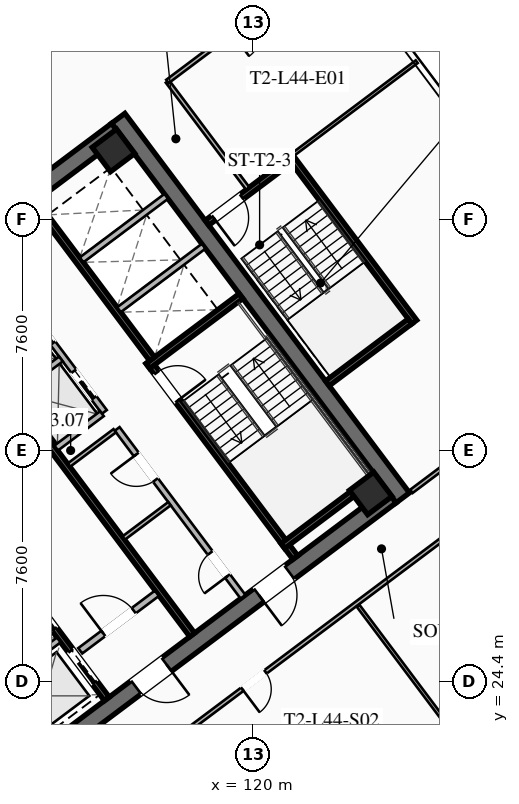
"""IFC4 building model, lengths in metres.
Left out: names, types, materials, properties, quantities, classifications, styles, units other than length and angle.
Written with IfcOpenShell. Run it as: python <this file> out.ifc"""

import sys

from ifc_helpers import new_model, si_unit, direction, frame, frame_2d, origin, origin_2d, place, context, subcontext, project, spatial, rectangle, hollow_rectangle, extrude, element, fill, save


model = new_model("IFC4")
c1 = context("Model", 3, precision=1e-05, world=origin(), true_north=direction((0.0, 1.0)))
c2 = subcontext(c1, "Body", "Model", "MODEL_VIEW")
j1 = project(units=[si_unit("LENGTHUNIT", "METRE"), si_unit("PLANEANGLEUNIT", "RADIAN")], contexts=[c1])
p1 = place(None, origin())
s1 = spatial("IfcSite", under=j1, at=p1, CompositionType="ELEMENT")
p2 = place(p1, origin())
s2 = spatial("IfcBuilding", under=s1, at=p2, CompositionType="ELEMENT")
p3 = place(p2, frame((0.0, 0.0, 164.1)))
s3 = spatial("IfcBuildingStorey", under=s2, at=p3, CompositionType="ELEMENT", Elevation=164.1)
p4 = place(p3, frame((115.564, 42.923, 0.0), z_axis=(0.0, 0.0, 1.0), x_axis=(0.600005007985, -0.799996243986, 0.0)))
e1 = element("IfcWall", 1, at=p4, inside=s3, PredefinedType="SHEAR", context=c2, shape_type="SweptSolid", body=[
    extrude(rectangle(XDim=15.6, YDim=0.55, at=frame_2d((7.8, 0.0))), origin(), (0.0, 0.0, 1.0), 3.55),
])
p5 = place(p3, frame((124.539, 30.498, 0.0), z_axis=(0.0, 0.0, 1.0), x_axis=(-0.799998054672, -0.600002593761, 0.0)))
e2 = element("IfcWall", 2, at=p5, inside=s3, PredefinedType="SHEAR", context=c2, shape_type="SweptSolid", body=[
    extrude(rectangle(XDim=15.06, YDim=0.55, at=frame_2d((7.53, 0.0))), origin(), (0.0, 0.0, 1.0), 3.55),
])
p6 = place(p5, frame((9.23, 0.0, 0.0)))
e3 = element("IfcOpeningElement", 3, at=p6, cuts=e2, PredefinedType="OPENING", context=c2, shape_type="SweptSolid", body=[
    extrude(rectangle(XDim=1.25, YDim=2.25, at=frame_2d((0.625, 1.125))), frame((0.0, 0.285, 0.0), z_axis=(0.0, -1.0, 0.0), x_axis=(1.0, 0.0, 0.0)), (0.0, 0.0, 1.0), 0.57),
])
p7 = place(p5, frame((4.18, 0.0, 0.0)))
e4 = element("IfcOpeningElement", 4, at=p7, cuts=e2, PredefinedType="OPENING", context=c2, shape_type="SweptSolid", body=[
    extrude(rectangle(XDim=1.25, YDim=2.25, at=frame_2d((0.625, 1.125))), frame((0.0, 0.285, 0.0), z_axis=(0.0, -1.0, 0.0), x_axis=(1.0, 0.0, 0.0)), (0.0, 0.0, 1.0), 0.57),
])
p8 = place(p3, frame((103.461, 33.502, 0.0), z_axis=(0.0, 0.0, 1.0), x_axis=(0.799998054672, 0.600002593761, 0.0)))
e5 = element("IfcWall", 5, at=p8, inside=s3, PredefinedType="SHEAR", context=c2, shape_type="SweptSolid", body=[
    extrude(rectangle(XDim=15.06, YDim=0.55, at=frame_2d((7.53, 0.0))), origin(), (0.0, 0.0, 1.0), 3.55),
])
p9 = place(p8, frame((4.58, 0.0, 0.0)))
e6 = element("IfcOpeningElement", 6, at=p9, cuts=e5, PredefinedType="OPENING", context=c2, shape_type="SweptSolid", body=[
    extrude(rectangle(XDim=1.25, YDim=2.25, at=frame_2d((0.625, 1.125))), frame((0.0, 0.285, 0.0), z_axis=(0.0, -1.0, 0.0), x_axis=(1.0, 0.0, 0.0)), (0.0, 0.0, 1.0), 0.57),
])
p10 = place(p8, frame((9.63, 0.0, 0.0)))
e7 = element("IfcOpeningElement", 7, at=p10, cuts=e5, PredefinedType="OPENING", context=c2, shape_type="SweptSolid", body=[
    extrude(rectangle(XDim=1.25, YDim=2.25, at=frame_2d((0.625, 1.125))), frame((0.0, 0.285, 0.0), z_axis=(0.0, -1.0, 0.0), x_axis=(1.0, 0.0, 0.0)), (0.0, 0.0, 1.0), 0.57),
])
for number, where, z_axis, x_axis in (
    (8, (123.87, 30.59, 0.0), (0.0, 0.0, 1.0), (0.8, 0.6, 0.0)),
    (9, (115.41, 41.87, 0.0), (0.0, 0.0, 1.0), (0.8, 0.6, 0.0)),
):
    element("IfcColumn", number, at=place(p3, frame(where, z_axis=z_axis, x_axis=x_axis)), inside=s3, PredefinedType="COLUMN", context=c2, shape_type="SweptSolid", body=[
        extrude(hollow_rectangle(XDim=1.0, YDim=1.0, WallThickness=0.04, at=origin_2d()), origin(), (0.0, 0.0, 1.0), 3.37),
    ])
p11 = place(p3, frame((116.56, 34.92, 0.0), z_axis=(0.0, 0.0, 1.0), x_axis=(0.59999029481, -0.8000072788, 0.0)))
e10 = element("IfcWall", 10, at=p11, inside=s3, PredefinedType="SHEAR", context=c2, shape_type="SweptSolid", body=[
    extrude(rectangle(XDim=8.05, YDim=0.2, at=frame_2d((4.025, 0.0))), origin(), (0.0, 0.0, 1.0), 3.37),
])
p12 = place(p11, frame((0.45, 0.0, 0.0)))
e11 = element("IfcOpeningElement", 11, at=p12, cuts=e10, PredefinedType="OPENING", context=c2, shape_type="SweptSolid", body=[
    extrude(rectangle(XDim=1.15, YDim=2.2, at=frame_2d((0.575, 1.1))), frame((0.0, 0.11, 0.0), z_axis=(0.0, -1.0, 0.0), x_axis=(1.0, 0.0, 0.0)), (0.0, 0.0, 1.0), 0.22),
])
for number, where, z_axis, x_axis in (
    (12, (116.54, 34.78, 0.0), (0.0, 0.0, 1.0), (0.8, 0.6, 0.0)),
    (13, (120.98, 28.86, 0.0), (0.0, 0.0, 1.0), (0.8, 0.6, 0.0)),
):
    element("IfcWall", number, at=place(p3, frame(where, z_axis=z_axis, x_axis=x_axis)), inside=s3, PredefinedType="SHEAR", context=c2, shape_type="SweptSolid", body=[
        extrude(rectangle(XDim=3.83, YDim=0.2, at=frame_2d((1.915, 0.0))), origin(), (0.0, 0.0, 1.0), 3.37),
    ])
p13 = place(p3, frame((117.998, 25.936, 0.0), z_axis=(0.0, 0.0, 1.0), x_axis=(-0.600002693989, 0.799997979501, 0.0)))
e14 = element("IfcWall", 14, at=p13, inside=s3, PredefinedType="SHEAR", context=c2, shape_type="SweptSolid", body=[
    extrude(rectangle(XDim=14.5, YDim=0.2, at=frame_2d((7.25, 0.0))), origin(), (0.0, 0.0, 1.0), 3.37),
])
p14 = place(p3, frame((114.316, 25.412, 0.0), z_axis=(0.0, 0.0, 1.0), x_axis=(0.800018601094, 0.59997519774, 0.0)))
e15 = element("IfcWall", 15, at=p14, inside=s3, PredefinedType="SOLIDWALL", context=c2, shape_type="SweptSolid", body=[
    extrude(rectangle(XDim=3.15, YDim=0.22, at=frame_2d((1.575, 0.0))), origin(), (0.0, 0.0, 1.0), 2.723),
])
p15 = place(p14, frame((0.95, 0.0, 0.0)))
e16 = element("IfcOpeningElement", 16, at=p15, cuts=e15, PredefinedType="OPENING", context=c2, shape_type="SweptSolid", body=[
    extrude(rectangle(XDim=1.25, YDim=2.25, at=frame_2d((0.625, 1.125))), frame((0.0, 0.12, 0.0), z_axis=(0.0, -1.0, 0.0), x_axis=(1.0, 0.0, 0.0)), (0.0, 0.0, 1.0), 0.24),
])
p16 = place(p3, frame((115.19, 23.83, 0.0), z_axis=(0.0, 0.0, 1.0), x_axis=(-0.599993943644, 0.800004542231, 0.0)))
e17 = element("IfcWall", 17, at=p16, inside=s3, PredefinedType="SHEAR", context=c2, shape_type="SweptSolid", body=[
    extrude(rectangle(XDim=6.45, YDim=0.2, at=frame_2d((3.225, 0.0))), origin(), (0.0, 0.0, 1.0), 3.37),
])
p17 = place(p16, frame((4.875, 0.0, 0.0)))
e18 = element("IfcOpeningElement", 18, at=p17, cuts=e17, PredefinedType="OPENING", context=c2, shape_type="SweptSolid", body=[
    extrude(rectangle(XDim=1.3, YDim=2.25, at=frame_2d((0.65, 1.125))), frame((0.0, 0.11, 0.0), z_axis=(0.0, -1.0, 0.0), x_axis=(1.0, 0.0, 0.0)), (0.0, 0.0, 1.0), 0.22),
])
p18 = place(p16, frame((2.875, 0.0, 0.0)))
e19 = element("IfcOpeningElement", 19, at=p18, cuts=e17, PredefinedType="OPENING", context=c2, shape_type="SweptSolid", body=[
    extrude(rectangle(XDim=1.3, YDim=2.25, at=frame_2d((0.65, 1.125))), frame((0.0, 0.11, 0.0), z_axis=(0.0, -1.0, 0.0), x_axis=(1.0, 0.0, 0.0)), (0.0, 0.0, 1.0), 0.22),
])
p19 = place(p16, frame((0.675, 0.0, 0.0)))
e20 = element("IfcOpeningElement", 20, at=p19, cuts=e17, PredefinedType="OPENING", context=c2, shape_type="SweptSolid", body=[
    extrude(rectangle(XDim=1.3, YDim=2.25, at=frame_2d((0.65, 1.125))), frame((0.0, 0.11, 0.0), z_axis=(0.0, -1.0, 0.0), x_axis=(1.0, 0.0, 0.0)), (0.0, 0.0, 1.0), 0.22),
])
p20 = place(p3, frame((110.826, 23.682, 0.0), z_axis=(0.0, 0.0, 1.0), x_axis=(0.8, 0.6, 0.0)))
e21 = element("IfcWall", 21, at=p20, inside=s3, PredefinedType="SOLIDWALL", context=c2, shape_type="SweptSolid", body=[
    extrude(rectangle(XDim=3.48, YDim=0.2, at=frame_2d((1.74, 0.0))), origin(), (0.0, 0.0, 1.0), 3.37),
])
p21 = place(p3, frame((112.81, 40.17, 0.0), z_axis=(0.0, 0.0, 1.0), x_axis=(0.599993943644, -0.800004542231, 0.0)))
e22 = element("IfcWall", 22, at=p21, inside=s3, PredefinedType="SHEAR", context=c2, shape_type="SweptSolid", body=[
    extrude(rectangle(XDim=6.45, YDim=0.2, at=frame_2d((3.225, 0.0))), origin(), (0.0, 0.0, 1.0), 3.37),
])
for number, where, z_axis, x_axis in (
    (23, (115.59, 36.63, 0.0), (0.0, 0.0, 1.0), (0.8, 0.6, 0.0)),
    (24, (114.36, 38.27, 0.0), (0.0, 0.0, 1.0), (0.8, 0.6, 0.0)),
):
    element("IfcWall", number, at=place(p3, frame(where, z_axis=z_axis, x_axis=x_axis)), inside=s3, PredefinedType="SOLIDWALL", context=c2, shape_type="SweptSolid", body=[
        extrude(rectangle(XDim=3.48, YDim=0.2, at=frame_2d((1.74, 0.0))), origin(), (0.0, 0.0, 1.0), 3.37),
    ])
p22 = place(p3, frame((119.67, 27.19, 0.0), z_axis=(0.0, 0.0, 1.0), x_axis=(-0.599988677396, 0.800008491828, 0.0)))
e25 = element("IfcWall", 25, at=p22, inside=s3, PredefinedType="SOLIDWALL", context=c2, shape_type="SweptSolid", body=[
    extrude(rectangle(XDim=6.9, YDim=0.2, at=frame_2d((3.45, 0.0))), origin(), (0.0, 0.0, 1.0), 2.723),
])
p23 = place(p22, frame((0.85, 0.0, 0.0)))
e26 = element("IfcOpeningElement", 26, at=p23, cuts=e25, PredefinedType="OPENING", context=c2, shape_type="SweptSolid", body=[
    extrude(rectangle(XDim=0.95, YDim=2.05, at=frame_2d((0.475, 1.025))), frame((0.0, 0.11, 0.0), z_axis=(0.0, -1.0, 0.0), x_axis=(1.0, 0.0, 0.0)), (0.0, 0.0, 1.0), 0.22),
])
p24 = place(p22, frame((4.8, 0.0, 0.0)))
e27 = element("IfcOpeningElement", 27, at=p24, cuts=e25, PredefinedType="OPENING", context=c2, shape_type="SweptSolid", body=[
    extrude(rectangle(XDim=1.05, YDim=2.2, at=frame_2d((0.525, 1.1))), frame((0.0, 0.11, 0.0), z_axis=(0.0, -1.0, 0.0), x_axis=(1.0, 0.0, 0.0)), (0.0, 0.0, 1.0), 0.22),
])
for number, where, z_axis, x_axis in (
    (28, (113.946, 31.522, 0.0), (0.0, 0.0, 1.0), (0.8, 0.6, 0.0)),
    (29, (115.746, 29.122, 0.0), (0.0, 0.0, 1.0), (0.8, 0.6, 0.0)),
):
    element("IfcWall", number, at=place(p3, frame(where, z_axis=z_axis, x_axis=x_axis)), inside=s3, PredefinedType="PARTITIONING", context=c2, shape_type="SweptSolid", body=[
        extrude(rectangle(XDim=1.88, YDim=0.135, at=frame_2d((0.94, 0.0))), origin(), (0.0, 0.0, 1.0), 2.723),
    ])
p25 = place(p3, frame((115.11, 33.27, 0.0), z_axis=(0.0, 0.0, 1.0), x_axis=(-0.600011322243, 0.799991508192, 0.0)))
e30 = element("IfcWall", 30, at=p25, inside=s3, PredefinedType="SOLIDWALL", context=c2, shape_type="SweptSolid", body=[
    extrude(rectangle(XDim=6.9, YDim=0.2, at=frame_2d((3.45, 0.0))), origin(), (0.0, 0.0, 1.0), 3.37),
])
p26 = place(p25, frame((0.575, 0.0, 0.0)))
e31 = element("IfcOpeningElement", 31, at=p26, cuts=e30, PredefinedType="OPENING", context=c2, shape_type="SweptSolid", body=[
    extrude(rectangle(XDim=1.1, YDim=2.2, at=frame_2d((0.55, 1.1))), frame((0.0, 0.11, 0.0), z_axis=(0.0, -1.0, 0.0), x_axis=(1.0, 0.0, 0.0)), (0.0, 0.0, 1.0), 0.22),
])
p27 = place(p25, frame((2.825, 0.0, 0.0)))
e32 = element("IfcOpeningElement", 32, at=p27, cuts=e30, PredefinedType="OPENING", context=c2, shape_type="SweptSolid", body=[
    extrude(rectangle(XDim=1.1, YDim=2.2, at=frame_2d((0.55, 1.1))), frame((0.0, 0.11, 0.0), z_axis=(0.0, -1.0, 0.0), x_axis=(1.0, 0.0, 0.0)), (0.0, 0.0, 1.0), 0.22),
])
p28 = place(p25, frame((5.075, 0.0, 0.0)))
e33 = element("IfcOpeningElement", 33, at=p28, cuts=e30, PredefinedType="OPENING", context=c2, shape_type="SweptSolid", body=[
    extrude(rectangle(XDim=1.1, YDim=2.2, at=frame_2d((0.55, 1.1))), frame((0.0, 0.11, 0.0), z_axis=(0.0, -1.0, 0.0), x_axis=(1.0, 0.0, 0.0)), (0.0, 0.0, 1.0), 0.22),
])
p29 = place(p3, frame((113.526, 32.082, 0.0), z_axis=(0.0, 0.0, 1.0), x_axis=(0.800046745961, 0.599937666993, 0.0)))
e34 = element("IfcWall", 34, at=p29, inside=s3, PredefinedType="SOLIDWALL", context=c2, shape_type="SweptSolid", body=[
    extrude(rectangle(XDim=1.88, YDim=0.2, at=frame_2d((0.94, 0.0))), origin(), (0.0, 0.0, 1.0), 3.37),
])
p30 = place(p3, frame((112.176, 33.882, 0.0), z_axis=(0.0, 0.0, 1.0), x_axis=(0.8, 0.6, 0.0)))
e35 = element("IfcWall", 35, at=p30, inside=s3, PredefinedType="SOLIDWALL", context=c2, shape_type="SweptSolid", body=[
    extrude(rectangle(XDim=1.88, YDim=0.2, at=frame_2d((0.94, 0.0))), origin(), (0.0, 0.0, 1.0), 3.37),
])
p31 = place(p3, frame((125.304, 36.228, 0.0), z_axis=(0.0, 0.0, 1.0), x_axis=(-0.59998851072, 0.800008616831, 0.0)))
e36 = element("IfcWall", 36, at=p31, inside=s3, PredefinedType="SHEAR", context=c2, shape_type="SweptSolid", body=[
    extrude(rectangle(XDim=6.8, YDim=0.2, at=frame_2d((3.4, 0.0))), origin(), (0.0, 0.0, 1.0), 3.37),
])
p32 = place(p3, frame((121.204, 41.528, 0.0), z_axis=(0.0, 0.0, 1.0), x_axis=(-0.800017232136, -0.599977023131, 0.0)))
e37 = element("IfcWall", 37, at=p32, inside=s3, PredefinedType="SHEAR", context=c2, shape_type="SweptSolid", body=[
    extrude(rectangle(XDim=3.4, YDim=0.2, at=frame_2d((1.7, 0.0))), origin(), (0.0, 0.0, 1.0), 3.37),
])
p33 = place(p32, frame((1.975, 0.0, 0.0)))
e38 = element("IfcOpeningElement", 38, at=p33, cuts=e37, PredefinedType="OPENING", context=c2, shape_type="SweptSolid", body=[
    extrude(rectangle(XDim=1.15, YDim=2.2, at=frame_2d((0.575, 1.1))), frame((0.0, 0.11, 0.0), z_axis=(0.0, -1.0, 0.0), x_axis=(1.0, 0.0, 0.0)), (0.0, 0.0, 1.0), 0.22),
])
p34 = place(p3, frame((122.444, 34.208, 0.0), z_axis=(0.0, 0.0, 1.0), x_axis=(0.79999138319, 0.600011488909, 0.0)))
e39 = element("IfcWall", 39, at=p34, inside=s3, PredefinedType="SHEAR", context=c2, shape_type="SweptSolid", body=[
    extrude(rectangle(XDim=3.4, YDim=0.2, at=frame_2d((1.7, 0.0))), origin(), (0.0, 0.0, 1.0), 3.37),
])
p35 = place(p3, frame((119.824, 40.618, 0.0), z_axis=(0.0, 0.0, 1.0), x_axis=(-0.599982243973, 0.800013316712, 0.0)))
e40 = element("IfcWall", 40, at=p35, inside=s3, PredefinedType="PARTITIONING", context=c2, shape_type="SweptSolid", body=[
    extrude(rectangle(XDim=4.4, YDim=0.135, at=frame_2d((2.2, 0.0))), origin(), (0.0, 0.0, 1.0), 2.723),
])
p36 = place(p3, frame((95.8, 32.35, 0.0), z_axis=(0.0, 0.0, 1.0), x_axis=(0.8, 0.6, 0.0)))
e41 = element("IfcWall", 41, at=p36, inside=s3, PredefinedType="PARTITIONING", context=c2, shape_type="SweptSolid", body=[
    extrude(rectangle(XDim=28.7, YDim=0.135, at=frame_2d((14.35, 0.0))), origin(), (0.0, 0.0, 1.0), 2.723),
])
p37 = place(p36, frame((0.3, 0.0, 0.0)))
e42 = element("IfcOpeningElement", 42, at=p37, cuts=e41, PredefinedType="OPENING", context=c2, shape_type="SweptSolid", body=[
    extrude(rectangle(XDim=0.95, YDim=2.05, at=frame_2d((0.475, 1.025))), frame((0.0, 0.077, 0.0), z_axis=(0.0, -1.0, 0.0), x_axis=(1.0, 0.0, 0.0)), (0.0, 0.0, 1.0), 0.155),
])
p38 = place(p36, frame((9.959, 0.0, 0.0)))
e43 = element("IfcOpeningElement", 43, at=p38, cuts=e41, PredefinedType="OPENING", context=c2, shape_type="SweptSolid", body=[
    extrude(rectangle(XDim=0.95, YDim=2.05, at=frame_2d((0.475, 1.025))), frame((0.0, 0.077, 0.0), z_axis=(0.0, -1.0, 0.0), x_axis=(1.0, 0.0, 0.0)), (0.0, 0.0, 1.0), 0.155),
])
p39 = place(p36, frame((14.005, 0.0, 0.0)))
e44 = element("IfcOpeningElement", 44, at=p39, cuts=e41, PredefinedType="OPENING", context=c2, shape_type="SweptSolid", body=[
    extrude(rectangle(XDim=0.95, YDim=2.05, at=frame_2d((0.475, 1.025))), frame((0.0, 0.077, 0.0), z_axis=(0.0, -1.0, 0.0), x_axis=(1.0, 0.0, 0.0)), (0.0, 0.0, 1.0), 0.155),
])
p40 = place(p36, frame((18.049, 0.0, 0.0)))
e45 = element("IfcOpeningElement", 45, at=p40, cuts=e41, PredefinedType="OPENING", context=c2, shape_type="SweptSolid", body=[
    extrude(rectangle(XDim=0.95, YDim=2.05, at=frame_2d((0.475, 1.025))), frame((0.0, 0.077, 0.0), z_axis=(0.0, -1.0, 0.0), x_axis=(1.0, 0.0, 0.0)), (0.0, 0.0, 1.0), 0.155),
])
p41 = place(p36, frame((27.45, 0.0, 0.0)))
e46 = element("IfcOpeningElement", 46, at=p41, cuts=e41, PredefinedType="OPENING", context=c2, shape_type="SweptSolid", body=[
    extrude(rectangle(XDim=0.95, YDim=2.05, at=frame_2d((0.475, 1.025))), frame((0.0, 0.077, 0.0), z_axis=(0.0, -1.0, 0.0), x_axis=(1.0, 0.0, 0.0)), (0.0, 0.0, 1.0), 0.155),
])
p42 = place(p3, frame((131.282, 32.874, 0.0), z_axis=(0.0, 0.0, 1.0), x_axis=(-0.8, -0.6, 0.0)))
e47 = element("IfcWall", 47, at=p42, inside=s3, PredefinedType="PARTITIONING", context=c2, shape_type="SweptSolid", body=[
    extrude(rectangle(XDim=28.7, YDim=0.135, at=frame_2d((14.35, 0.0))), origin(), (0.0, 0.0, 1.0), 2.723),
])
p43 = place(p42, frame((27.37, 0.0, 0.0)))
e48 = element("IfcOpeningElement", 48, at=p43, cuts=e47, PredefinedType="OPENING", context=c2, shape_type="SweptSolid", body=[
    extrude(rectangle(XDim=0.95, YDim=2.05, at=frame_2d((0.475, 1.025))), frame((0.0, 0.077, 0.0), z_axis=(0.0, -1.0, 0.0), x_axis=(1.0, 0.0, 0.0)), (0.0, 0.0, 1.0), 0.155),
])
p44 = place(p42, frame((13.592, 0.0, 0.0)))
e49 = element("IfcOpeningElement", 49, at=p44, cuts=e47, PredefinedType="OPENING", context=c2, shape_type="SweptSolid", body=[
    extrude(rectangle(XDim=0.95, YDim=2.05, at=frame_2d((0.475, 1.025))), frame((0.0, 0.077, 0.0), z_axis=(0.0, -1.0, 0.0), x_axis=(1.0, 0.0, 0.0)), (0.0, 0.0, 1.0), 0.155),
])
p45 = place(p42, frame((0.38, 0.0, 0.0)))
e50 = element("IfcOpeningElement", 50, at=p45, cuts=e47, PredefinedType="OPENING", context=c2, shape_type="SweptSolid", body=[
    extrude(rectangle(XDim=0.95, YDim=2.05, at=frame_2d((0.475, 1.025))), frame((0.0, 0.077, 0.0), z_axis=(0.0, -1.0, 0.0), x_axis=(1.0, 0.0, 0.0)), (0.0, 0.0, 1.0), 0.155),
])
p46 = place(p3, frame((127.668, 21.276, 0.0), z_axis=(0.0, 0.0, 1.0), x_axis=(-0.6, 0.8, 0.0)))
e51 = element("IfcWall", 51, at=p46, inside=s3, PredefinedType="PARTITIONING", context=c2, shape_type="SweptSolid", body=[
    extrude(rectangle(XDim=7.03, YDim=0.11, at=frame_2d((3.515, 0.0))), origin(), (0.0, 0.0, 1.0), 2.723),
])
p47 = place(p3, frame((122.744, 48.308, 0.0), z_axis=(0.0, 0.0, 1.0), x_axis=(-0.79997892247, -0.600028102345, 0.0)))
e52 = element("IfcWall", 52, at=p47, inside=s3, PredefinedType="PARTITIONING", context=c2, shape_type="SweptSolid", body=[
    extrude(rectangle(XDim=6.95, YDim=0.135, at=frame_2d((3.475, 0.0))), origin(), (0.0, 0.0, 1.0), 2.723),
])
p48 = place(p47, frame((3.35, 0.0, 0.0)))
e53 = element("IfcOpeningElement", 53, at=p48, cuts=e52, PredefinedType="OPENING", context=c2, shape_type="SweptSolid", body=[
    extrude(rectangle(XDim=0.95, YDim=2.05, at=frame_2d((0.475, 1.025))), frame((0.0, 0.077, 0.0), z_axis=(0.0, -1.0, 0.0), x_axis=(1.0, 0.0, 0.0)), (0.0, 0.0, 1.0), 0.155),
])
p49 = place(p3, frame((125.208, 30.656, 0.0), z_axis=(0.0, 0.0, 1.0), x_axis=(0.800006797429, 0.599990936654, 0.0)))
e54 = element("IfcWall", 54, at=p49, inside=s3, PredefinedType="PARTITIONING", context=c2, shape_type="SweptSolid", body=[
    extrude(rectangle(XDim=8.62, YDim=0.135, at=frame_2d((4.31, 0.0))), origin(), (0.0, 0.0, 1.0), 2.723),
])
p50 = place(p49, frame((2.045, 0.0, 0.0)))
e55 = element("IfcOpeningElement", 55, at=p50, cuts=e54, PredefinedType="OPENING", context=c2, shape_type="SweptSolid", body=[
    extrude(rectangle(XDim=0.95, YDim=2.05, at=frame_2d((0.475, 1.025))), frame((0.0, 0.077, 0.0), z_axis=(0.0, -1.0, 0.0), x_axis=(1.0, 0.0, 0.0)), (0.0, 0.0, 1.0), 0.155),
])
p51 = place(p3, frame((125.384, 44.788, 0.0), z_axis=(0.0, 0.0, 1.0), x_axis=(-0.8, -0.6, 0.0)))
e56 = element("IfcWall", 56, at=p51, inside=s3, PredefinedType="PARTITIONING", context=c2, shape_type="SweptSolid", body=[
    extrude(rectangle(XDim=5.1, YDim=0.11, at=frame_2d((2.55, 0.0))), origin(), (0.0, 0.0, 1.0), 2.723),
])
p52 = place(p6, origin())
e57 = element("IfcDoor", 57, at=p52, inside=s3, OperationType="SINGLE_SWING_LEFT", PredefinedType="DOOR", context=c2, shape_type="SweptSolid", body=[
    extrude(rectangle(XDim=1.25, YDim=2.25, at=frame_2d((0.625, 1.125))), frame((0.0, 0.025, 0.0), z_axis=(0.0, -1.0, 0.0), x_axis=(1.0, 0.0, 0.0)), (0.0, 0.0, 1.0), 0.05),
])
fill(e3, e57)
p53 = place(p7, origin())
e58 = element("IfcDoor", 58, at=p53, inside=s3, OperationType="SINGLE_SWING_RIGHT", PredefinedType="DOOR", context=c2, shape_type="SweptSolid", body=[
    extrude(rectangle(XDim=1.25, YDim=2.25, at=frame_2d((0.625, 1.125))), frame((0.0, 0.025, 0.0), z_axis=(0.0, -1.0, 0.0), x_axis=(1.0, 0.0, 0.0)), (0.0, 0.0, 1.0), 0.05),
])
fill(e4, e58)
p54 = place(p12, origin())
e59 = element("IfcDoor", 59, at=p54, inside=s3, OperationType="SINGLE_SWING_RIGHT", PredefinedType="DOOR", context=c2, shape_type="SweptSolid", body=[
    extrude(rectangle(XDim=1.15, YDim=2.2, at=frame_2d((0.575, 1.1))), frame((0.0, 0.025, 0.0), z_axis=(0.0, -1.0, 0.0), x_axis=(1.0, 0.0, 0.0)), (0.0, 0.0, 1.0), 0.05),
])
fill(e11, e59)
p55 = place(p15, origin())
e60 = element("IfcDoor", 60, at=p55, inside=s3, OperationType="SINGLE_SWING_LEFT", PredefinedType="DOOR", context=c2, shape_type="SweptSolid", body=[
    extrude(rectangle(XDim=1.25, YDim=2.25, at=frame_2d((0.625, 1.125))), frame((0.0, 0.025, 0.0), z_axis=(0.0, -1.0, 0.0), x_axis=(1.0, 0.0, 0.0)), (0.0, 0.0, 1.0), 0.05),
])
fill(e16, e60)
p56 = place(p23, origin())
e61 = element("IfcDoor", 61, at=p56, inside=s3, OperationType="SINGLE_SWING_LEFT", PredefinedType="DOOR", context=c2, shape_type="SweptSolid", body=[
    extrude(rectangle(XDim=0.95, YDim=2.05, at=frame_2d((0.475, 1.025))), frame((0.0, 0.025, 0.0), z_axis=(0.0, -1.0, 0.0), x_axis=(1.0, 0.0, 0.0)), (0.0, 0.0, 1.0), 0.05),
])
fill(e26, e61)
p57 = place(p24, origin())
e62 = element("IfcDoor", 62, at=p57, inside=s3, OperationType="SINGLE_SWING_RIGHT", PredefinedType="DOOR", context=c2, shape_type="SweptSolid", body=[
    extrude(rectangle(XDim=1.05, YDim=2.2, at=frame_2d((0.525, 1.1))), frame((0.0, 0.025, 0.0), z_axis=(0.0, -1.0, 0.0), x_axis=(1.0, 0.0, 0.0)), (0.0, 0.0, 1.0), 0.05),
])
fill(e27, e62)
p58 = place(p33, origin())
e63 = element("IfcDoor", 63, at=p58, inside=s3, OperationType="SINGLE_SWING_RIGHT", PredefinedType="DOOR", context=c2, shape_type="SweptSolid", body=[
    extrude(rectangle(XDim=1.15, YDim=2.2, at=frame_2d((0.575, 1.1))), frame((0.0, 0.025, 0.0), z_axis=(0.0, -1.0, 0.0), x_axis=(1.0, 0.0, 0.0)), (0.0, 0.0, 1.0), 0.05),
])
fill(e38, e63)
p59 = place(p44, origin())
e64 = element("IfcDoor", 64, at=p59, inside=s3, OperationType="SINGLE_SWING_RIGHT", PredefinedType="DOOR", context=c2, shape_type="SweptSolid", body=[
    extrude(rectangle(XDim=0.95, YDim=2.05, at=frame_2d((0.475, 1.025))), frame((0.0, 0.025, 0.0), z_axis=(0.0, -1.0, 0.0), x_axis=(1.0, 0.0, 0.0)), (0.0, 0.0, 1.0), 0.05),
])
fill(e49, e64)
p60 = place(p18, origin())
e65 = element("IfcDoor", 65, at=p60, inside=s3, OperationType="SLIDING_TO_LEFT", PredefinedType="DOOR", context=c2, shape_type="SweptSolid", body=[
    extrude(rectangle(XDim=1.3, YDim=2.25, at=frame_2d((0.65, 1.125))), frame((0.0, 0.025, 0.0), z_axis=(0.0, -1.0, 0.0), x_axis=(1.0, 0.0, 0.0)), (0.0, 0.0, 1.0), 0.05),
])
fill(e19, e65)
p61 = place(p19, origin())
e66 = element("IfcDoor", 66, at=p61, inside=s3, OperationType="SLIDING_TO_LEFT", PredefinedType="DOOR", context=c2, shape_type="SweptSolid", body=[
    extrude(rectangle(XDim=1.3, YDim=2.25, at=frame_2d((0.65, 1.125))), frame((0.0, 0.025, 0.0), z_axis=(0.0, -1.0, 0.0), x_axis=(1.0, 0.0, 0.0)), (0.0, 0.0, 1.0), 0.05),
])
fill(e20, e66)
p62 = place(p26, origin())
e67 = element("IfcDoor", 67, at=p62, inside=s3, OperationType="SLIDING_TO_LEFT", PredefinedType="DOOR", context=c2, shape_type="SweptSolid", body=[
    extrude(rectangle(XDim=1.1, YDim=2.2, at=frame_2d((0.55, 1.1))), frame((0.0, 0.025, 0.0), z_axis=(0.0, -1.0, 0.0), x_axis=(1.0, 0.0, 0.0)), (0.0, 0.0, 1.0), 0.05),
])
fill(e31, e67)
p63 = place(p27, origin())
e68 = element("IfcDoor", 68, at=p63, inside=s3, OperationType="SLIDING_TO_LEFT", PredefinedType="DOOR", context=c2, shape_type="SweptSolid", body=[
    extrude(rectangle(XDim=1.1, YDim=2.2, at=frame_2d((0.55, 1.1))), frame((0.0, 0.025, 0.0), z_axis=(0.0, -1.0, 0.0), x_axis=(1.0, 0.0, 0.0)), (0.0, 0.0, 1.0), 0.05),
])
fill(e32, e68)
save(model, sys.argv[1])
